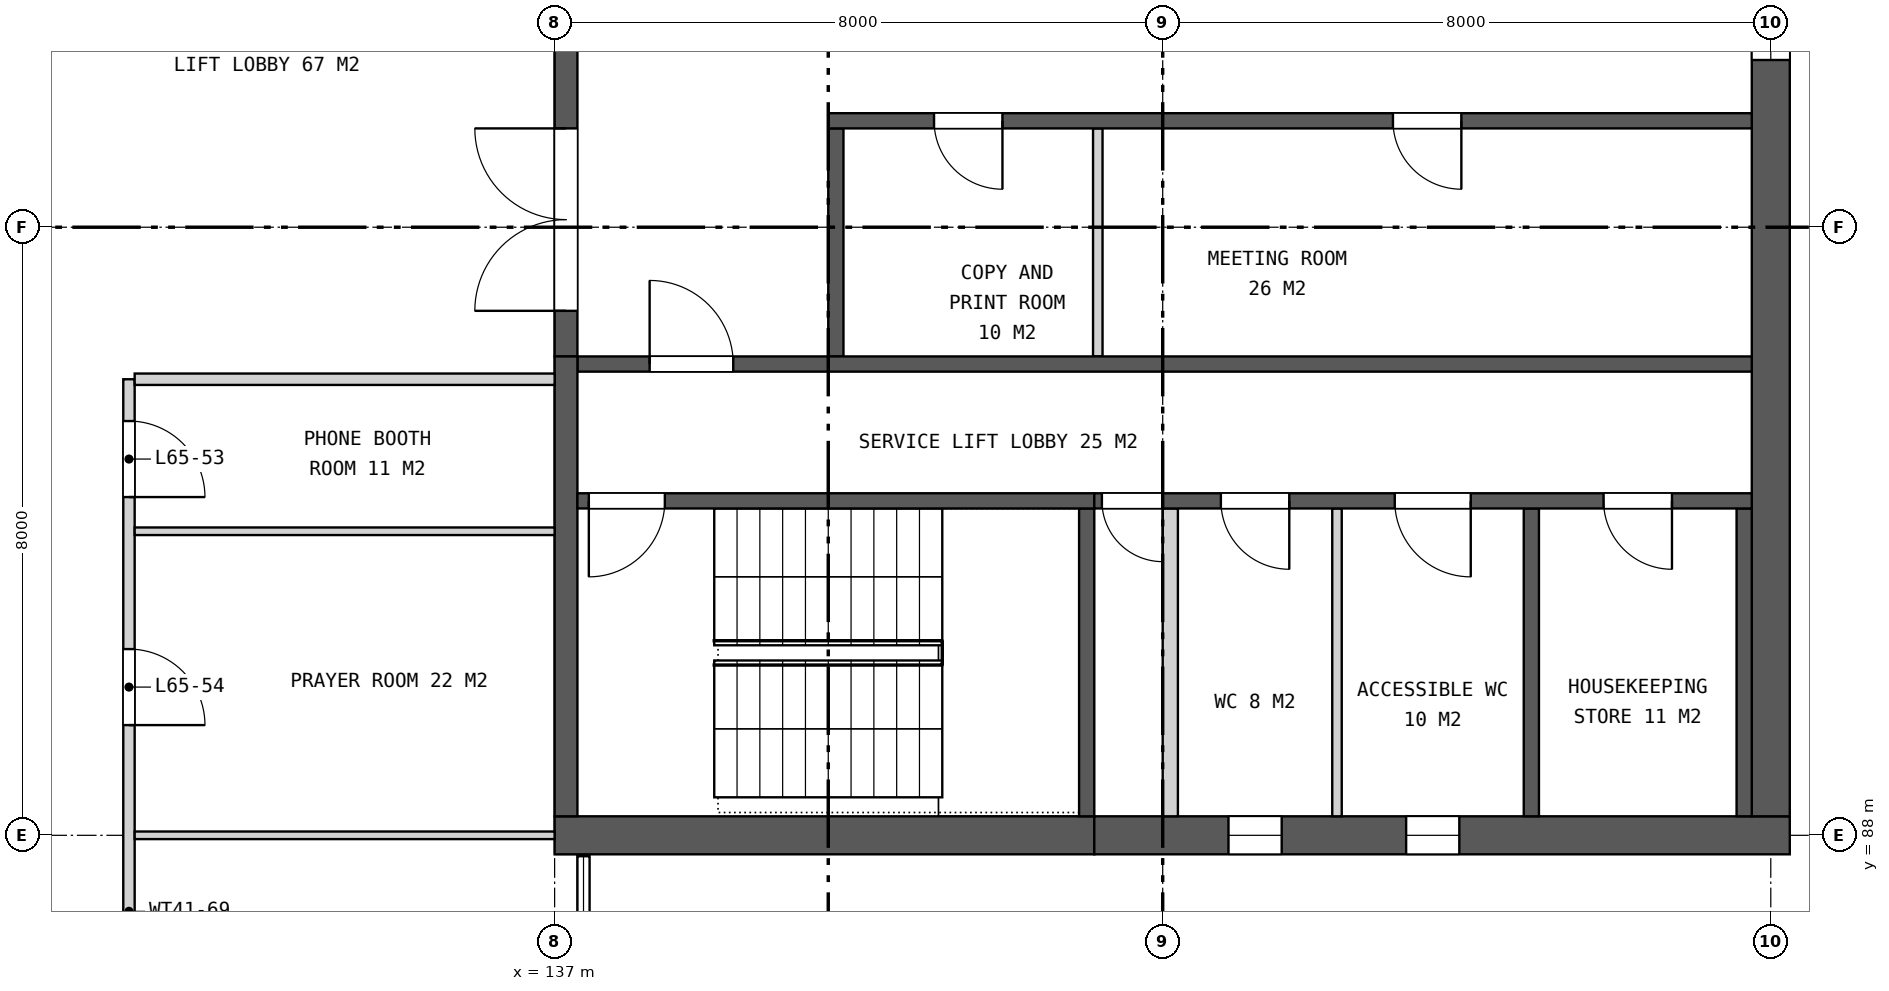
"""IFC4 building model, lengths in metres.
Left out: names, types, materials, properties, quantities, classifications, styles, units other than length and angle.
Written with IfcOpenShell. Run it as: python <this file> out.ifc"""

import sys

from ifc_helpers import new_model, si_unit, direction, frame, frame_2d, origin, place, context, subcontext, project, spatial, rectangle, extrude, element, fill, save


model = new_model("IFC4")
c1 = context("Model", 3, precision=1e-05, world=origin(), true_north=direction((0.0, 1.0)))
c2 = subcontext(c1, "Body", "Model", "MODEL_VIEW")
j1 = project(units=[si_unit("LENGTHUNIT", "METRE"), si_unit("PLANEANGLEUNIT", "RADIAN")], contexts=[c1])
p1 = place(None, origin())
s1 = spatial("IfcSite", under=j1, at=p1, CompositionType="ELEMENT")
p2 = place(p1, origin())
s2 = spatial("IfcBuilding", under=s1, at=p2, CompositionType="ELEMENT")
p3 = place(p2, frame((0.0, 0.0, 299.7)))
s3 = spatial("IfcBuildingStorey", under=s2, at=p3, CompositionType="ELEMENT", Elevation=299.7)
p4 = place(p3, frame((137.0, 88.0, 0.0), z_axis=(0.0, 0.0, 1.0), x_axis=(1.0, 0.0, 0.0)))
e1 = element("IfcWall", 1, at=p4, inside=s3, PredefinedType="SHEAR", context=c2, shape_type="SweptSolid", body=[
    extrude(rectangle(XDim=7.1, YDim=0.5, at=frame_2d((3.55, 0.0))), origin(), (0.0, 0.0, 1.0), 4.2),
])
p5 = place(p3, frame((144.1, 88.0, 0.0), z_axis=(0.0, 0.0, 1.0), x_axis=(1.0, 0.0, 0.0)))
e2 = element("IfcWall", 2, at=p5, inside=s3, PredefinedType="SHEAR", context=c2, shape_type="SweptSolid", body=[
    extrude(rectangle(XDim=9.15, YDim=0.5, at=frame_2d((4.575, 0.0))), origin(), (0.0, 0.0, 1.0), 4.2),
])
p6 = place(p5, frame((1.765, 0.0, 1.5)))
e3 = element("IfcOpeningElement", 3, at=p6, cuts=e2, PredefinedType="OPENING", context=c2, shape_type="SweptSolid", body=[
    extrude(rectangle(XDim=0.7, YDim=0.9, at=frame_2d((0.35, 0.45))), frame((0.0, 0.26, 0.0), z_axis=(0.0, -1.0, 0.0), x_axis=(1.0, 0.0, 0.0)), (0.0, 0.0, 1.0), 0.52),
])
p7 = place(p5, frame((4.103, 0.0, 1.5)))
e4 = element("IfcOpeningElement", 4, at=p7, cuts=e2, PredefinedType="OPENING", context=c2, shape_type="SweptSolid", body=[
    extrude(rectangle(XDim=0.7, YDim=0.9, at=frame_2d((0.35, 0.45))), frame((0.0, 0.26, 0.0), z_axis=(0.0, -1.0, 0.0), x_axis=(1.0, 0.0, 0.0)), (0.0, 0.0, 1.0), 0.52),
])
p8 = place(p3, frame((153.0, 88.25, 0.0), z_axis=(0.0, 0.0, 1.0), x_axis=(0.0, 1.0, 0.0)))
e5 = element("IfcWall", 5, at=p8, inside=s3, PredefinedType="SHEAR", context=c2, shape_type="SweptSolid", body=[
    extrude(rectangle(XDim=23.5, YDim=0.5, at=frame_2d((11.75, 0.0))), origin(), (0.0, 0.0, 1.0), 4.2),
])
p9 = place(p8, frame((9.95, 0.0, 0.15)))
e6 = element("IfcOpeningElement", 6, at=p9, cuts=e5, PredefinedType="OPENING", context=c2, shape_type="SweptSolid", body=[
    extrude(rectangle(XDim=3.6, YDim=3.0, at=frame_2d((1.8, 1.5))), frame((0.0, 0.26, 0.0), z_axis=(0.0, -1.0, 0.0), x_axis=(1.0, 0.0, 0.0)), (0.0, 0.0, 1.0), 0.52),
])
p10 = place(p3, frame((137.15, 94.3, 0.0), z_axis=(0.0, 0.0, 1.0), x_axis=(0.0, 1.0, 0.0)))
e7 = element("IfcWall", 7, at=p10, inside=s3, PredefinedType="SHEAR", context=c2, shape_type="SweptSolid", body=[
    extrude(rectangle(XDim=11.4, YDim=0.3, at=frame_2d((5.7, 0.0))), origin(), (0.0, 0.0, 1.0), 4.2),
])
p11 = place(p10, frame((0.6, 0.0, 0.0)))
e8 = element("IfcOpeningElement", 8, at=p11, cuts=e7, PredefinedType="OPENING", context=c2, shape_type="SweptSolid", body=[
    extrude(rectangle(XDim=2.4, YDim=2.4, at=frame_2d((1.2, 1.2))), frame((0.0, 0.16, 0.0), z_axis=(0.0, -1.0, 0.0), x_axis=(1.0, 0.0, 0.0)), (0.0, 0.0, 1.0), 0.32),
])
p12 = place(p10, frame((4.5, 0.0, 0.0)))
e9 = element("IfcOpeningElement", 9, at=p12, cuts=e7, PredefinedType="OPENING", context=c2, shape_type="SweptSolid", body=[
    extrude(rectangle(XDim=2.4, YDim=2.4, at=frame_2d((1.2, 1.2))), frame((0.0, 0.16, 0.0), z_axis=(0.0, -1.0, 0.0), x_axis=(1.0, 0.0, 0.0)), (0.0, 0.0, 1.0), 0.32),
])
p13 = place(p10, frame((8.4, 0.0, 0.0)))
e10 = element("IfcOpeningElement", 10, at=p13, cuts=e7, PredefinedType="OPENING", context=c2, shape_type="SweptSolid", body=[
    extrude(rectangle(XDim=2.4, YDim=2.4, at=frame_2d((1.2, 1.2))), frame((0.0, 0.16, 0.0), z_axis=(0.0, -1.0, 0.0), x_axis=(1.0, 0.0, 0.0)), (0.0, 0.0, 1.0), 0.32),
])
p14 = place(p3, frame((140.7, 94.3, 0.0), z_axis=(0.0, 0.0, 1.0), x_axis=(0.0, 1.0, 0.0)))
e11 = element("IfcWall", 11, at=p14, inside=s3, PredefinedType="SHEAR", context=c2, shape_type="SweptSolid", body=[
    extrude(rectangle(XDim=3.0, YDim=0.2, at=frame_2d((1.5, 0.0))), origin(), (0.0, 0.0, 1.0), 4.2),
])
p15 = place(p3, frame((144.146, 94.3, 0.0), z_axis=(0.0, 0.0, 1.0), x_axis=(0.0, 1.0, 0.0)))
e12 = element("IfcWall", 12, at=p15, inside=s3, PredefinedType="PARTITIONING", context=c2, shape_type="SweptSolid", body=[
    extrude(rectangle(XDim=3.0, YDim=0.125, at=frame_2d((1.5, 0.0))), origin(), (0.0, 0.0, 1.0), 4.2),
])
p16 = place(p3, frame((140.6, 97.4, 0.0), z_axis=(0.0, 0.0, 1.0), x_axis=(1.0, 0.0, 0.0)))
e13 = element("IfcWall", 13, at=p16, inside=s3, PredefinedType="SHEAR", context=c2, shape_type="SweptSolid", body=[
    extrude(rectangle(XDim=12.15, YDim=0.2, at=frame_2d((6.075, 0.0))), origin(), (0.0, 0.0, 1.0), 4.2),
])
p17 = place(p16, frame((1.392, 0.0, 0.0)))
e14 = element("IfcOpeningElement", 14, at=p17, cuts=e13, PredefinedType="OPENING", context=c2, shape_type="SweptSolid", body=[
    extrude(rectangle(XDim=0.9, YDim=2.1, at=frame_2d((0.45, 1.05))), frame((0.0, 0.11, 0.0), z_axis=(0.0, -1.0, 0.0), x_axis=(1.0, 0.0, 0.0)), (0.0, 0.0, 1.0), 0.22),
])
p18 = place(p16, frame((7.429, 0.0, 0.0)))
e15 = element("IfcOpeningElement", 15, at=p18, cuts=e13, PredefinedType="OPENING", context=c2, shape_type="SweptSolid", body=[
    extrude(rectangle(XDim=0.9, YDim=2.1, at=frame_2d((0.45, 1.05))), frame((0.0, 0.11, 0.0), z_axis=(0.0, -1.0, 0.0), x_axis=(1.0, 0.0, 0.0)), (0.0, 0.0, 1.0), 0.22),
])
p19 = place(p3, frame((137.3, 94.2, 0.0), z_axis=(0.0, 0.0, 1.0), x_axis=(1.0, 0.0, 0.0)))
e16 = element("IfcWall", 16, at=p19, inside=s3, PredefinedType="SHEAR", context=c2, shape_type="SweptSolid", body=[
    extrude(rectangle(XDim=15.45, YDim=0.2, at=frame_2d((7.725, 0.0))), origin(), (0.0, 0.0, 1.0), 4.2),
])
p20 = place(p19, frame((0.95, 0.0, 0.0)))
e17 = element("IfcOpeningElement", 17, at=p20, cuts=e16, PredefinedType="OPENING", context=c2, shape_type="SweptSolid", body=[
    extrude(rectangle(XDim=1.1, YDim=2.1, at=frame_2d((0.55, 1.05))), frame((0.0, 0.11, 0.0), z_axis=(0.0, -1.0, 0.0), x_axis=(1.0, 0.0, 0.0)), (0.0, 0.0, 1.0), 0.22),
])
p21 = place(p3, frame((137.15, 88.25, 0.0), z_axis=(0.0, 0.0, 1.0), x_axis=(0.0, 1.0, 0.0)))
e18 = element("IfcWall", 18, at=p21, inside=s3, PredefinedType="SHEAR", context=c2, shape_type="SweptSolid", body=[
    extrude(rectangle(XDim=6.05, YDim=0.3, at=frame_2d((3.025, 0.0))), origin(), (0.0, 0.0, 1.0), 4.2),
])
for number, where, z_axis, x_axis in (
    (19, (144.0, 88.25, 0.0), (0.0, 0.0, 1.0), (0.0, 1.0, 0.0)),
    (20, (149.85, 88.25, 0.0), (0.0, 0.0, 1.0), (0.0, 1.0, 0.0)),
    (21, (152.65, 88.25, 0.0), (0.0, 0.0, 1.0), (0.0, 1.0, 0.0)),
):
    element("IfcWall", number, at=place(p3, frame(where, z_axis=z_axis, x_axis=x_axis)), inside=s3, PredefinedType="SHEAR", context=c2, shape_type="SweptSolid", body=[
        extrude(rectangle(XDim=4.05, YDim=0.2, at=frame_2d((2.025, 0.0))), origin(), (0.0, 0.0, 1.0), 4.2),
    ])
p22 = place(p3, frame((145.1, 88.25, 0.0), z_axis=(0.0, 0.0, 1.0), x_axis=(0.0, 1.0, 0.0)))
e22 = element("IfcWall", 22, at=p22, inside=s3, PredefinedType="PARTITIONING", context=c2, shape_type="SweptSolid", body=[
    extrude(rectangle(XDim=4.05, YDim=0.2, at=frame_2d((2.025, 0.0))), origin(), (0.0, 0.0, 1.0), 4.2),
])
p23 = place(p3, frame((147.293, 88.25, 0.0), z_axis=(0.0, 0.0, 1.0), x_axis=(0.0, 1.0, 0.0)))
e23 = element("IfcWall", 23, at=p23, inside=s3, PredefinedType="PARTITIONING", context=c2, shape_type="SweptSolid", body=[
    extrude(rectangle(XDim=4.05, YDim=0.125, at=frame_2d((2.025, 0.0))), origin(), (0.0, 0.0, 1.0), 4.2),
])
p24 = place(p3, frame((137.3, 92.4, 0.0), z_axis=(0.0, 0.0, 1.0), x_axis=(1.0, 0.0, 0.0)))
e24 = element("IfcWall", 24, at=p24, inside=s3, PredefinedType="SHEAR", context=c2, shape_type="SweptSolid", body=[
    extrude(rectangle(XDim=6.8, YDim=0.2, at=frame_2d((3.4, 0.0))), origin(), (0.0, 0.0, 1.0), 4.2),
])
p25 = place(p24, frame((0.15, 0.0, 0.0)))
e25 = element("IfcOpeningElement", 25, at=p25, cuts=e24, PredefinedType="OPENING", context=c2, shape_type="SweptSolid", body=[
    extrude(rectangle(XDim=1.0, YDim=2.1, at=frame_2d((0.5, 1.05))), frame((0.0, 0.11, 0.0), z_axis=(0.0, -1.0, 0.0), x_axis=(1.0, 0.0, 0.0)), (0.0, 0.0, 1.0), 0.22),
])
p26 = place(p3, frame((144.1, 92.4, 0.0), z_axis=(0.0, 0.0, 1.0), x_axis=(1.0, 0.0, 0.0)))
e26 = element("IfcWall", 26, at=p26, inside=s3, PredefinedType="SHEAR", context=c2, shape_type="SweptSolid", body=[
    extrude(rectangle(XDim=8.65, YDim=0.2, at=frame_2d((4.325, 0.0))), origin(), (0.0, 0.0, 1.0), 4.2),
])
p27 = place(p26, frame((0.1, 0.0, 0.0)))
e27 = element("IfcOpeningElement", 27, at=p27, cuts=e26, PredefinedType="OPENING", context=c2, shape_type="SweptSolid", body=[
    extrude(rectangle(XDim=0.8, YDim=2.1, at=frame_2d((0.4, 1.05))), frame((0.0, 0.11, 0.0), z_axis=(0.0, -1.0, 0.0), x_axis=(1.0, 0.0, 0.0)), (0.0, 0.0, 1.0), 0.22),
])
p28 = place(p26, frame((1.665, 0.0, 0.0)))
e28 = element("IfcOpeningElement", 28, at=p28, cuts=e26, PredefinedType="OPENING", context=c2, shape_type="SweptSolid", body=[
    extrude(rectangle(XDim=0.9, YDim=2.1, at=frame_2d((0.45, 1.05))), frame((0.0, 0.11, 0.0), z_axis=(0.0, -1.0, 0.0), x_axis=(1.0, 0.0, 0.0)), (0.0, 0.0, 1.0), 0.22),
])
p29 = place(p26, frame((3.953, 0.0, 0.0)))
e29 = element("IfcOpeningElement", 29, at=p29, cuts=e26, PredefinedType="OPENING", context=c2, shape_type="SweptSolid", body=[
    extrude(rectangle(XDim=1.0, YDim=2.1, at=frame_2d((0.5, 1.05))), frame((0.0, 0.11, 0.0), z_axis=(0.0, -1.0, 0.0), x_axis=(1.0, 0.0, 0.0)), (0.0, 0.0, 1.0), 0.22),
])
p30 = place(p26, frame((6.7, 0.0, 0.0)))
e30 = element("IfcOpeningElement", 30, at=p30, cuts=e26, PredefinedType="OPENING", context=c2, shape_type="SweptSolid", body=[
    extrude(rectangle(XDim=0.9, YDim=2.1, at=frame_2d((0.45, 1.05))), frame((0.0, 0.11, 0.0), z_axis=(0.0, -1.0, 0.0), x_axis=(1.0, 0.0, 0.0)), (0.0, 0.0, 1.0), 0.22),
])
p31 = place(p3, frame((131.4, 80.0, 0.0), z_axis=(0.0, 0.0, 1.0), x_axis=(0.0, 1.0, 0.0)))
e31 = element("IfcWall", 31, at=p31, inside=s3, PredefinedType="PARTITIONING", context=c2, shape_type="SweptSolid", body=[
    extrude(rectangle(XDim=14.0, YDim=0.15, at=frame_2d((7.0, 0.0))), origin(), (0.0, 0.0, 1.0), 3.255),
])
p32 = place(p31, frame((12.45, 0.0, 0.0)))
e32 = element("IfcOpeningElement", 32, at=p32, cuts=e31, PredefinedType="OPENING", context=c2, shape_type="SweptSolid", body=[
    extrude(rectangle(XDim=1.0, YDim=2.1, at=frame_2d((0.5, 1.05))), frame((0.0, 0.085, 0.0), z_axis=(0.0, -1.0, 0.0), x_axis=(1.0, 0.0, 0.0)), (0.0, 0.0, 1.0), 0.17),
])
p33 = place(p31, frame((9.45, 0.0, 0.0)))
e33 = element("IfcOpeningElement", 33, at=p33, cuts=e31, PredefinedType="OPENING", context=c2, shape_type="SweptSolid", body=[
    extrude(rectangle(XDim=1.0, YDim=2.1, at=frame_2d((0.5, 1.05))), frame((0.0, 0.085, 0.0), z_axis=(0.0, -1.0, 0.0), x_axis=(1.0, 0.0, 0.0)), (0.0, 0.0, 1.0), 0.17),
])
p34 = place(p31, frame((3.45, 0.0, 0.0)))
e34 = element("IfcOpeningElement", 34, at=p34, cuts=e31, PredefinedType="OPENING", context=c2, shape_type="SweptSolid", body=[
    extrude(rectangle(XDim=1.0, YDim=2.1, at=frame_2d((0.5, 1.05))), frame((0.0, 0.085, 0.0), z_axis=(0.0, -1.0, 0.0), x_axis=(1.0, 0.0, 0.0)), (0.0, 0.0, 1.0), 0.17),
])
for number, where, z_axis, x_axis in (
    (35, (131.475, 88.0, 0.0), (0.0, 0.0, 1.0), (1.0, 0.0, 0.0)),
    (36, (131.475, 92.0, 0.0), (0.0, 0.0, 1.0), (1.0, 0.0, 0.0)),
):
    element("IfcWall", number, at=place(p3, frame(where, z_axis=z_axis, x_axis=x_axis)), inside=s3, PredefinedType="PARTITIONING", context=c2, shape_type="SweptSolid", body=[
        extrude(rectangle(XDim=5.525, YDim=0.1, at=frame_2d((2.762, 0.0))), origin(), (0.0, 0.0, 1.0), 3.255),
    ])
p35 = place(p3, frame((131.475, 94.0, 0.0), z_axis=(0.0, 0.0, 1.0), x_axis=(1.0, 0.0, 0.0)))
e37 = element("IfcWall", 37, at=p35, inside=s3, PredefinedType="PARTITIONING", context=c2, shape_type="SweptSolid", body=[
    extrude(rectangle(XDim=5.525, YDim=0.15, at=frame_2d((2.762, 0.0))), origin(), (0.0, 0.0, 1.0), 3.255),
])
p36 = place(p6, origin())
e38 = element("IfcWindow", 38, at=p36, inside=s3, PartitioningType="SINGLE_PANEL", PredefinedType="WINDOW", context=c2, shape_type="SweptSolid", body=[
    extrude(rectangle(XDim=0.7, YDim=0.9, at=frame_2d((0.35, 0.45))), frame((0.0, 0.03, 0.0), z_axis=(0.0, -1.0, 0.0), x_axis=(1.0, 0.0, 0.0)), (0.0, 0.0, 1.0), 0.06),
])
fill(e3, e38)
p37 = place(p7, origin())
e39 = element("IfcWindow", 39, at=p37, inside=s3, PartitioningType="SINGLE_PANEL", PredefinedType="WINDOW", context=c2, shape_type="SweptSolid", body=[
    extrude(rectangle(XDim=0.7, YDim=0.9, at=frame_2d((0.35, 0.45))), frame((0.0, 0.03, 0.0), z_axis=(0.0, -1.0, 0.0), x_axis=(1.0, 0.0, 0.0)), (0.0, 0.0, 1.0), 0.06),
])
fill(e4, e39)
p38 = place(p9, origin())
e40 = element("IfcWindow", 40, at=p38, inside=s3, PartitioningType="SINGLE_PANEL", PredefinedType="WINDOW", context=c2, shape_type="SweptSolid", body=[
    extrude(rectangle(XDim=3.6, YDim=3.0, at=frame_2d((1.8, 1.5))), frame((0.0, 0.03, 0.0), z_axis=(0.0, -1.0, 0.0), x_axis=(1.0, 0.0, 0.0)), (0.0, 0.0, 1.0), 0.06),
])
fill(e6, e40)
p39 = place(p11, origin())
e41 = element("IfcDoor", 41, at=p39, inside=s3, OperationType="DOUBLE_DOOR_SINGLE_SWING", PredefinedType="DOOR", context=c2, shape_type="SweptSolid", body=[
    extrude(rectangle(XDim=2.4, YDim=2.4, at=frame_2d((1.2, 1.2))), frame((0.0, 0.025, 0.0), z_axis=(0.0, -1.0, 0.0), x_axis=(1.0, 0.0, 0.0)), (0.0, 0.0, 1.0), 0.05),
])
fill(e8, e41)
p40 = place(p17, frame((0.9, 0.0, 0.0), z_axis=(0.0, 0.0, 1.0), x_axis=(-1.0, 0.0, 0.0)))
e42 = element("IfcDoor", 42, at=p40, inside=s3, OperationType="SINGLE_SWING_LEFT", PredefinedType="DOOR", context=c2, shape_type="SweptSolid", body=[
    extrude(rectangle(XDim=0.9, YDim=2.1, at=frame_2d((0.45, 1.05))), frame((0.0, 0.025, 0.0), z_axis=(0.0, -1.0, 0.0), x_axis=(1.0, 0.0, 0.0)), (0.0, 0.0, 1.0), 0.05),
])
fill(e14, e42)
p41 = place(p18, frame((0.9, 0.0, 0.0), z_axis=(0.0, 0.0, 1.0), x_axis=(-1.0, 0.0, 0.0)))
e43 = element("IfcDoor", 43, at=p41, inside=s3, OperationType="SINGLE_SWING_LEFT", PredefinedType="DOOR", context=c2, shape_type="SweptSolid", body=[
    extrude(rectangle(XDim=0.9, YDim=2.1, at=frame_2d((0.45, 1.05))), frame((0.0, 0.025, 0.0), z_axis=(0.0, -1.0, 0.0), x_axis=(1.0, 0.0, 0.0)), (0.0, 0.0, 1.0), 0.05),
])
fill(e15, e43)
p42 = place(p20, origin())
e44 = element("IfcDoor", 44, at=p42, inside=s3, OperationType="SINGLE_SWING_LEFT", PredefinedType="DOOR", context=c2, shape_type="SweptSolid", body=[
    extrude(rectangle(XDim=1.1, YDim=2.1, at=frame_2d((0.55, 1.05))), frame((0.0, 0.025, 0.0), z_axis=(0.0, -1.0, 0.0), x_axis=(1.0, 0.0, 0.0)), (0.0, 0.0, 1.0), 0.05),
])
fill(e17, e44)
p43 = place(p25, frame((1.0, 0.0, 0.0), z_axis=(0.0, 0.0, 1.0), x_axis=(-1.0, 0.0, 0.0)))
e45 = element("IfcDoor", 45, at=p43, inside=s3, OperationType="SINGLE_SWING_RIGHT", PredefinedType="DOOR", context=c2, shape_type="SweptSolid", body=[
    extrude(rectangle(XDim=1.0, YDim=2.1, at=frame_2d((0.5, 1.05))), frame((0.0, 0.025, 0.0), z_axis=(0.0, -1.0, 0.0), x_axis=(1.0, 0.0, 0.0)), (0.0, 0.0, 1.0), 0.05),
])
fill(e25, e45)
p44 = place(p27, frame((0.8, 0.0, 0.0), z_axis=(0.0, 0.0, 1.0), x_axis=(-1.0, 0.0, 0.0)))
e46 = element("IfcDoor", 46, at=p44, inside=s3, OperationType="SINGLE_SWING_LEFT", PredefinedType="DOOR", context=c2, shape_type="SweptSolid", body=[
    extrude(rectangle(XDim=0.8, YDim=2.1, at=frame_2d((0.4, 1.05))), frame((0.0, 0.025, 0.0), z_axis=(0.0, -1.0, 0.0), x_axis=(1.0, 0.0, 0.0)), (0.0, 0.0, 1.0), 0.05),
])
fill(e27, e46)
p45 = place(p28, frame((0.9, 0.0, 0.0), z_axis=(0.0, 0.0, 1.0), x_axis=(-1.0, 0.0, 0.0)))
e47 = element("IfcDoor", 47, at=p45, inside=s3, OperationType="SINGLE_SWING_LEFT", PredefinedType="DOOR", context=c2, shape_type="SweptSolid", body=[
    extrude(rectangle(XDim=0.9, YDim=2.1, at=frame_2d((0.45, 1.05))), frame((0.0, 0.025, 0.0), z_axis=(0.0, -1.0, 0.0), x_axis=(1.0, 0.0, 0.0)), (0.0, 0.0, 1.0), 0.05),
])
fill(e28, e47)
p46 = place(p29, frame((1.0, 0.0, 0.0), z_axis=(0.0, 0.0, 1.0), x_axis=(-1.0, 0.0, 0.0)))
e48 = element("IfcDoor", 48, at=p46, inside=s3, OperationType="SINGLE_SWING_LEFT", PredefinedType="DOOR", context=c2, shape_type="SweptSolid", body=[
    extrude(rectangle(XDim=1.0, YDim=2.1, at=frame_2d((0.5, 1.05))), frame((0.0, 0.025, 0.0), z_axis=(0.0, -1.0, 0.0), x_axis=(1.0, 0.0, 0.0)), (0.0, 0.0, 1.0), 0.05),
])
fill(e29, e48)
p47 = place(p30, frame((0.9, 0.0, 0.0), z_axis=(0.0, 0.0, 1.0), x_axis=(-1.0, 0.0, 0.0)))
e49 = element("IfcDoor", 49, at=p47, inside=s3, OperationType="SINGLE_SWING_LEFT", PredefinedType="DOOR", context=c2, shape_type="SweptSolid", body=[
    extrude(rectangle(XDim=0.9, YDim=2.1, at=frame_2d((0.45, 1.05))), frame((0.0, 0.025, 0.0), z_axis=(0.0, -1.0, 0.0), x_axis=(1.0, 0.0, 0.0)), (0.0, 0.0, 1.0), 0.05),
])
fill(e30, e49)
p48 = place(p32, frame((1.0, 0.0, 0.0), z_axis=(0.0, 0.0, 1.0), x_axis=(-1.0, 0.0, 0.0)))
e50 = element("IfcDoor", 50, at=p48, inside=s3, OperationType="SINGLE_SWING_RIGHT", PredefinedType="DOOR", context=c2, shape_type="SweptSolid", body=[
    extrude(rectangle(XDim=1.0, YDim=2.1, at=frame_2d((0.5, 1.05))), frame((0.0, 0.025, 0.0), z_axis=(0.0, -1.0, 0.0), x_axis=(1.0, 0.0, 0.0)), (0.0, 0.0, 1.0), 0.05),
])
fill(e32, e50)
p49 = place(p33, frame((1.0, 0.0, 0.0), z_axis=(0.0, 0.0, 1.0), x_axis=(-1.0, 0.0, 0.0)))
e51 = element("IfcDoor", 51, at=p49, inside=s3, OperationType="SINGLE_SWING_RIGHT", PredefinedType="DOOR", context=c2, shape_type="SweptSolid", body=[
    extrude(rectangle(XDim=1.0, YDim=2.1, at=frame_2d((0.5, 1.05))), frame((0.0, 0.025, 0.0), z_axis=(0.0, -1.0, 0.0), x_axis=(1.0, 0.0, 0.0)), (0.0, 0.0, 1.0), 0.05),
])
fill(e33, e51)
save(model, sys.argv[1])
